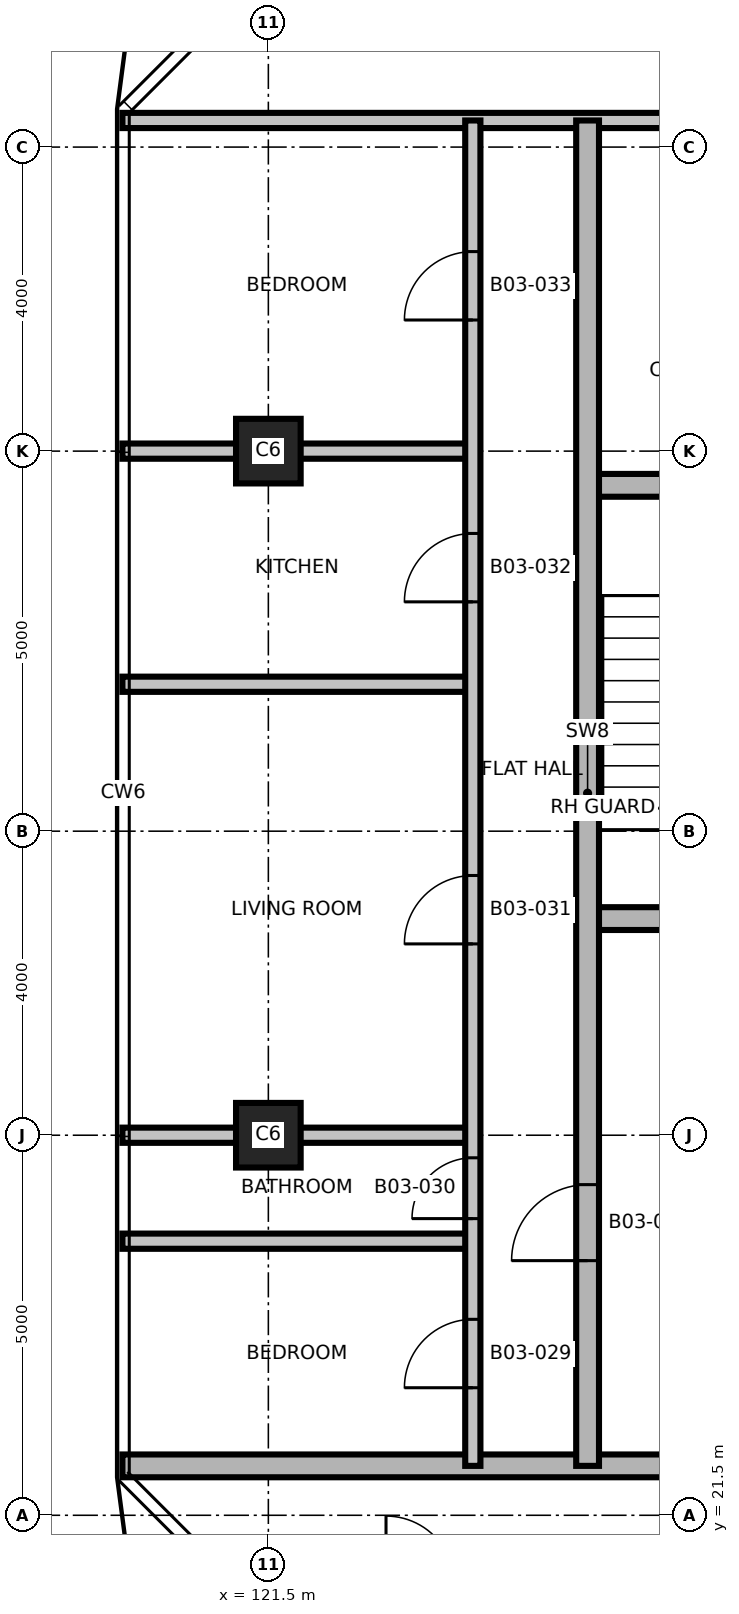
"""IFC4 building model, lengths in metres.
Left out: names, types, materials, properties, quantities, classifications, styles, units other than length and angle.
Written with IfcOpenShell. Run it as: python <this file> out.ifc"""

import sys

from ifc_helpers import new_model, si_unit, direction, frame, frame_2d, origin, origin_2d, place, context, subcontext, project, spatial, rectangle, extrude, element, fill, save


model = new_model("IFC4")
c1 = context("Model", 3, precision=1e-05, world=origin(), true_north=direction((0.0, 1.0)))
c2 = subcontext(c1, "Body", "Model", "MODEL_VIEW")
j1 = project(units=[si_unit("LENGTHUNIT", "METRE"), si_unit("PLANEANGLEUNIT", "RADIAN")], contexts=[c1])
p1 = place(None, origin())
s1 = spatial("IfcSite", under=j1, at=p1, CompositionType="ELEMENT")
p2 = place(p1, origin())
s2 = spatial("IfcBuilding", under=s1, at=p2, CompositionType="ELEMENT")
p3 = place(p2, frame((0.0, 0.0, 59.4)))
s3 = spatial("IfcBuildingStorey", under=s2, at=p3, CompositionType="ELEMENT", Elevation=59.4)
for number, where, z_axis, x_axis in (
    (1, (121.5, 26.5, 0.0), (0.0, 0.0, 1.0), (1.0, 0.0, 0.0)),
    (2, (121.5, 35.5, 0.0), (0.0, 0.0, 1.0), (1.0, 0.0, 0.0)),
):
    element("IfcColumn", number, at=place(p3, frame(where, z_axis=z_axis, x_axis=x_axis)), inside=s3, PredefinedType="COLUMN", context=c2, shape_type="SweptSolid", body=[
        extrude(rectangle(XDim=0.85, YDim=0.85, at=origin_2d()), origin(), (0.0, 0.0, 1.0), 3.7),
    ])
p4 = place(p3, frame((119.58, 22.15, 0.0), z_axis=(0.0, 0.0, 1.0), x_axis=(1.0, 0.0, 0.0)))
e3 = element("IfcWall", 3, at=p4, inside=s3, PredefinedType="SHEAR", context=c2, shape_type="SweptSolid", body=[
    extrude(rectangle(XDim=33.84, YDim=0.3, at=frame_2d((16.92, 0.0))), origin(), (0.0, 0.0, 1.0), 3.4),
])
p5 = place(p4, frame((23.17, 0.0, 0.0)))
e4 = element("IfcOpeningElement", 4, at=p5, cuts=e3, PredefinedType="OPENING", context=c2, shape_type="SweptSolid", body=[
    extrude(rectangle(XDim=1.0, YDim=2.1, at=frame_2d((0.5, 1.05))), frame((0.0, 0.16, 0.0), z_axis=(0.0, -1.0, 0.0), x_axis=(1.0, 0.0, 0.0)), (0.0, 0.0, 1.0), 0.32),
])
p6 = place(p4, frame((11.52, 0.0, 0.0)))
e5 = element("IfcOpeningElement", 5, at=p6, cuts=e3, PredefinedType="OPENING", context=c2, shape_type="SweptSolid", body=[
    extrude(rectangle(XDim=1.0, YDim=2.1, at=frame_2d((0.5, 1.05))), frame((0.0, 0.16, 0.0), z_axis=(0.0, -1.0, 0.0), x_axis=(1.0, 0.0, 0.0)), (0.0, 0.0, 1.0), 0.32),
])
p7 = place(p4, frame((25.07, 0.0, 0.0)))
e6 = element("IfcOpeningElement", 6, at=p7, cuts=e3, PredefinedType="OPENING", context=c2, shape_type="SweptSolid", body=[
    extrude(rectangle(XDim=1.0, YDim=2.1, at=frame_2d((0.5, 1.05))), frame((0.0, 0.16, 0.0), z_axis=(0.0, -1.0, 0.0), x_axis=(1.0, 0.0, 0.0)), (0.0, 0.0, 1.0), 0.32),
])
p8 = place(p4, frame((17.17, 0.0, 0.0)))
e7 = element("IfcOpeningElement", 7, at=p8, cuts=e3, PredefinedType="OPENING", context=c2, shape_type="SweptSolid", body=[
    extrude(rectangle(XDim=0.9, YDim=2.1, at=frame_2d((0.45, 1.05))), frame((0.0, 0.16, 0.0), z_axis=(0.0, -1.0, 0.0), x_axis=(1.0, 0.0, 0.0)), (0.0, 0.0, 1.0), 0.32),
])
for number, where, z_axis, x_axis in (
    (8, (119.58, 25.106, 0.0), (0.0, 0.0, 1.0), (1.0, 0.0, 0.0)),
    (9, (119.58, 26.5, 0.0), (0.0, 0.0, 1.0), (1.0, 0.0, 0.0)),
):
    element("IfcWall", number, at=place(p3, frame(where, z_axis=z_axis, x_axis=x_axis)), inside=s3, PredefinedType="PARTITIONING", context=c2, shape_type="SweptSolid", body=[
        extrude(rectangle(XDim=4.61, YDim=0.2, at=frame_2d((2.305, 0.0))), origin(), (0.0, 0.0, 1.0), 3.4),
    ])
p9 = place(p3, frame((125.7, 29.35, 0.0), z_axis=(0.0, 0.0, 1.0), x_axis=(1.0, 0.0, 0.0)))
e10 = element("IfcWall", 10, at=p9, inside=s3, PredefinedType="SHEAR", context=c2, shape_type="SweptSolid", body=[
    extrude(rectangle(XDim=2.83, YDim=0.3, at=frame_2d((1.415, 0.0))), origin(), (0.0, 0.0, 1.0), 3.4),
])
p10 = place(p9, frame((0.975, 0.0, 0.0)))
e11 = element("IfcOpeningElement", 11, at=p10, cuts=e10, PredefinedType="OPENING", context=c2, shape_type="SweptSolid", body=[
    extrude(rectangle(XDim=1.2, YDim=2.1, at=frame_2d((0.6, 1.05))), frame((0.0, 0.16, 0.0), z_axis=(0.0, -1.0, 0.0), x_axis=(1.0, 0.0, 0.0)), (0.0, 0.0, 1.0), 0.32),
])
p11 = place(p3, frame((119.58, 32.433, 0.0), z_axis=(0.0, 0.0, 1.0), x_axis=(1.0, 0.0, 0.0)))
e12 = element("IfcWall", 12, at=p11, inside=s3, PredefinedType="PARTITIONING", context=c2, shape_type="SweptSolid", body=[
    extrude(rectangle(XDim=4.61, YDim=0.2, at=frame_2d((2.305, 0.0))), origin(), (0.0, 0.0, 1.0), 3.4),
])
p12 = place(p3, frame((125.7, 35.05, 0.0), z_axis=(0.0, 0.0, 1.0), x_axis=(1.0, 0.0, 0.0)))
e13 = element("IfcWall", 13, at=p12, inside=s3, PredefinedType="SHEAR", context=c2, shape_type="SweptSolid", body=[
    extrude(rectangle(XDim=2.83, YDim=0.3, at=frame_2d((1.415, 0.0))), origin(), (0.0, 0.0, 1.0), 3.4),
])
p13 = place(p3, frame((119.58, 35.5, 0.0), z_axis=(0.0, 0.0, 1.0), x_axis=(1.0, 0.0, 0.0)))
e14 = element("IfcWall", 14, at=p13, inside=s3, PredefinedType="PARTITIONING", context=c2, shape_type="SweptSolid", body=[
    extrude(rectangle(XDim=4.61, YDim=0.2, at=frame_2d((2.305, 0.0))), origin(), (0.0, 0.0, 1.0), 3.4),
])
p14 = place(p3, frame((119.58, 39.85, 0.0), z_axis=(0.0, 0.0, 1.0), x_axis=(1.0, 0.0, 0.0)))
e15 = element("IfcWall", 15, at=p14, inside=s3, PredefinedType="PARTITIONING", context=c2, shape_type="SweptSolid", body=[
    extrude(rectangle(XDim=33.84, YDim=0.2, at=frame_2d((16.92, 0.0))), origin(), (0.0, 0.0, 1.0), 3.4),
])
p15 = place(p14, frame((15.27, 0.0, 0.0)))
e16 = element("IfcOpeningElement", 16, at=p15, cuts=e15, PredefinedType="OPENING", context=c2, shape_type="SweptSolid", body=[
    extrude(rectangle(XDim=1.0, YDim=2.1, at=frame_2d((0.5, 1.05))), frame((0.0, 0.11, 0.0), z_axis=(0.0, -1.0, 0.0), x_axis=(1.0, 0.0, 0.0)), (0.0, 0.0, 1.0), 0.22),
])
p16 = place(p14, frame((25.07, 0.0, 0.0)))
e17 = element("IfcOpeningElement", 17, at=p16, cuts=e15, PredefinedType="OPENING", context=c2, shape_type="SweptSolid", body=[
    extrude(rectangle(XDim=1.0, YDim=2.1, at=frame_2d((0.5, 1.05))), frame((0.0, 0.11, 0.0), z_axis=(0.0, -1.0, 0.0), x_axis=(1.0, 0.0, 0.0)), (0.0, 0.0, 1.0), 0.22),
])
p17 = place(p3, frame((124.19, 22.15, 0.0), z_axis=(0.0, 0.0, 1.0), x_axis=(0.0, 1.0, 0.0)))
e18 = element("IfcWall", 18, at=p17, inside=s3, PredefinedType="PARTITIONING", context=c2, shape_type="SweptSolid", body=[
    extrude(rectangle(XDim=17.7, YDim=0.2, at=frame_2d((8.85, 0.0))), origin(), (0.0, 0.0, 1.0), 3.4),
])
p18 = place(p17, frame((1.028, 0.0, 0.0)))
e19 = element("IfcOpeningElement", 19, at=p18, cuts=e18, PredefinedType="OPENING", context=c2, shape_type="SweptSolid", body=[
    extrude(rectangle(XDim=0.9, YDim=2.1, at=frame_2d((0.45, 1.05))), frame((0.0, 0.11, 0.0), z_axis=(0.0, -1.0, 0.0), x_axis=(1.0, 0.0, 0.0)), (0.0, 0.0, 1.0), 0.22),
])
p19 = place(p17, frame((3.253, 0.0, 0.0)))
e20 = element("IfcOpeningElement", 20, at=p19, cuts=e18, PredefinedType="OPENING", context=c2, shape_type="SweptSolid", body=[
    extrude(rectangle(XDim=0.8, YDim=2.1, at=frame_2d((0.4, 1.05))), frame((0.0, 0.11, 0.0), z_axis=(0.0, -1.0, 0.0), x_axis=(1.0, 0.0, 0.0)), (0.0, 0.0, 1.0), 0.22),
])
p20 = place(p17, frame((6.867, 0.0, 0.0)))
e21 = element("IfcOpeningElement", 21, at=p20, cuts=e18, PredefinedType="OPENING", context=c2, shape_type="SweptSolid", body=[
    extrude(rectangle(XDim=0.9, YDim=2.1, at=frame_2d((0.45, 1.05))), frame((0.0, 0.11, 0.0), z_axis=(0.0, -1.0, 0.0), x_axis=(1.0, 0.0, 0.0)), (0.0, 0.0, 1.0), 0.22),
])
p21 = place(p17, frame((11.367, 0.0, 0.0)))
e22 = element("IfcOpeningElement", 22, at=p21, cuts=e18, PredefinedType="OPENING", context=c2, shape_type="SweptSolid", body=[
    extrude(rectangle(XDim=0.9, YDim=2.1, at=frame_2d((0.45, 1.05))), frame((0.0, 0.11, 0.0), z_axis=(0.0, -1.0, 0.0), x_axis=(1.0, 0.0, 0.0)), (0.0, 0.0, 1.0), 0.22),
])
p22 = place(p17, frame((15.075, 0.0, 0.0)))
e23 = element("IfcOpeningElement", 23, at=p22, cuts=e18, PredefinedType="OPENING", context=c2, shape_type="SweptSolid", body=[
    extrude(rectangle(XDim=0.9, YDim=2.1, at=frame_2d((0.45, 1.05))), frame((0.0, 0.11, 0.0), z_axis=(0.0, -1.0, 0.0), x_axis=(1.0, 0.0, 0.0)), (0.0, 0.0, 1.0), 0.22),
])
p23 = place(p3, frame((125.7, 22.15, 0.0), z_axis=(0.0, 0.0, 1.0), x_axis=(0.0, 1.0, 0.0)))
e24 = element("IfcWall", 24, at=p23, inside=s3, PredefinedType="SHEAR", context=c2, shape_type="SweptSolid", body=[
    extrude(rectangle(XDim=17.7, YDim=0.3, at=frame_2d((8.85, 0.0))), origin(), (0.0, 0.0, 1.0), 3.4),
])
p24 = place(p23, frame((2.7, 0.0, 0.0)))
e25 = element("IfcOpeningElement", 25, at=p24, cuts=e24, PredefinedType="OPENING", context=c2, shape_type="SweptSolid", body=[
    extrude(rectangle(XDim=1.0, YDim=2.1, at=frame_2d((0.5, 1.05))), frame((0.0, 0.16, 0.0), z_axis=(0.0, -1.0, 0.0), x_axis=(1.0, 0.0, 0.0)), (0.0, 0.0, 1.0), 0.32),
])
p25 = place(p24, origin())
e26 = element("IfcDoor", 26, at=p25, inside=s3, OperationType="SINGLE_SWING_RIGHT", PredefinedType="DOOR", context=c2, shape_type="SweptSolid", body=[
    extrude(rectangle(XDim=1.0, YDim=2.1, at=frame_2d((0.5, 1.05))), frame((0.0, 0.025, 0.0), z_axis=(0.0, -1.0, 0.0), x_axis=(1.0, 0.0, 0.0)), (0.0, 0.0, 1.0), 0.05),
])
fill(e25, e26)
p26 = place(p18, origin())
e27 = element("IfcDoor", 27, at=p26, inside=s3, OperationType="SINGLE_SWING_LEFT", PredefinedType="DOOR", context=c2, shape_type="SweptSolid", body=[
    extrude(rectangle(XDim=0.9, YDim=2.1, at=frame_2d((0.45, 1.05))), frame((0.0, 0.025, 0.0), z_axis=(0.0, -1.0, 0.0), x_axis=(1.0, 0.0, 0.0)), (0.0, 0.0, 1.0), 0.05),
])
fill(e19, e27)
p27 = place(p19, origin())
e28 = element("IfcDoor", 28, at=p27, inside=s3, OperationType="SINGLE_SWING_RIGHT", PredefinedType="DOOR", context=c2, shape_type="SweptSolid", body=[
    extrude(rectangle(XDim=0.8, YDim=2.1, at=frame_2d((0.4, 1.05))), frame((0.0, 0.025, 0.0), z_axis=(0.0, -1.0, 0.0), x_axis=(1.0, 0.0, 0.0)), (0.0, 0.0, 1.0), 0.05),
])
fill(e20, e28)
p28 = place(p20, origin())
e29 = element("IfcDoor", 29, at=p28, inside=s3, OperationType="SINGLE_SWING_LEFT", PredefinedType="DOOR", context=c2, shape_type="SweptSolid", body=[
    extrude(rectangle(XDim=0.9, YDim=2.1, at=frame_2d((0.45, 1.05))), frame((0.0, 0.025, 0.0), z_axis=(0.0, -1.0, 0.0), x_axis=(1.0, 0.0, 0.0)), (0.0, 0.0, 1.0), 0.05),
])
fill(e21, e29)
p29 = place(p21, origin())
e30 = element("IfcDoor", 30, at=p29, inside=s3, OperationType="SINGLE_SWING_RIGHT", PredefinedType="DOOR", context=c2, shape_type="SweptSolid", body=[
    extrude(rectangle(XDim=0.9, YDim=2.1, at=frame_2d((0.45, 1.05))), frame((0.0, 0.025, 0.0), z_axis=(0.0, -1.0, 0.0), x_axis=(1.0, 0.0, 0.0)), (0.0, 0.0, 1.0), 0.05),
])
fill(e22, e30)
p30 = place(p22, origin())
e31 = element("IfcDoor", 31, at=p30, inside=s3, OperationType="SINGLE_SWING_LEFT", PredefinedType="DOOR", context=c2, shape_type="SweptSolid", body=[
    extrude(rectangle(XDim=0.9, YDim=2.1, at=frame_2d((0.45, 1.05))), frame((0.0, 0.025, 0.0), z_axis=(0.0, -1.0, 0.0), x_axis=(1.0, 0.0, 0.0)), (0.0, 0.0, 1.0), 0.05),
])
fill(e23, e31)
save(model, sys.argv[1])
